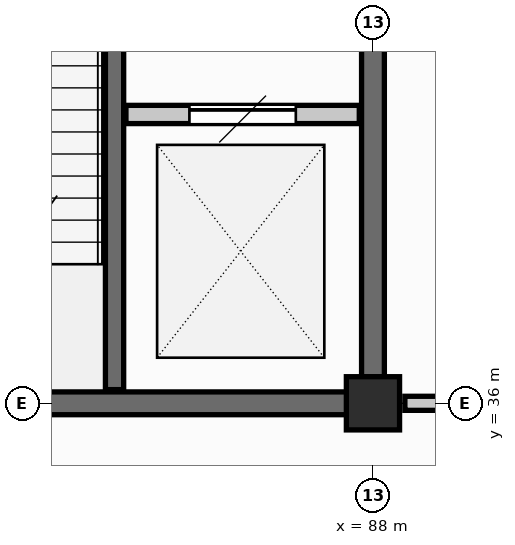
"""IFC4 building model, lengths in metres.
Left out: names, types, materials, properties, quantities, classifications, styles, units other than length and angle.
Written with IfcOpenShell. Run it as: python <this file> out.ifc"""

import sys

from ifc_helpers import new_model, si_unit, direction, frame, frame_2d, origin, origin_2d, place, context, subcontext, project, spatial, rectangle, extrude, element, fill, save


model = new_model("IFC4")
c1 = context("Model", 3, precision=1e-05, world=origin(), true_north=direction((0.0, 1.0)))
c2 = subcontext(c1, "Body", "Model", "MODEL_VIEW")
j1 = project(units=[si_unit("LENGTHUNIT", "METRE"), si_unit("PLANEANGLEUNIT", "RADIAN")], contexts=[c1])
p1 = place(None, origin())
s1 = spatial("IfcSite", under=j1, at=p1, CompositionType="ELEMENT")
p2 = place(p1, origin())
s2 = spatial("IfcBuilding", under=s1, at=p2, CompositionType="ELEMENT")
p3 = place(p2, origin())
s3 = spatial("IfcBuildingStorey", under=s2, at=p3, CompositionType="ELEMENT", Elevation=0.0)
p4 = place(p3, frame((88.0, 36.0, -1.25), z_axis=(0.0, 0.0, 1.0), x_axis=(1.0, 0.0, 0.0)))
e1 = element("IfcColumn", 1, at=p4, inside=s3, PredefinedType="COLUMN", context=c2, shape_type="SweptSolid", body=[
    extrude(rectangle(XDim=0.7, YDim=0.7, at=origin_2d()), origin(), (0.0, 0.0, 1.0), 6.05),
])
p5 = place(p3, frame((80.345, 36.0, -1.25), z_axis=(0.0, 0.0, 1.0), x_axis=(1.0, 0.0, 0.0)))
e2 = element("IfcWall", 2, at=p5, inside=s3, PredefinedType="SHEAR", context=c2, shape_type="SweptSolid", body=[
    extrude(rectangle(XDim=7.31, YDim=0.3, at=frame_2d((3.655, 0.0))), origin(), (0.0, 0.0, 1.0), 5.755),
])
p6 = place(p3, frame((88.0, 36.345, -1.25), z_axis=(0.0, 0.0, 1.0), x_axis=(0.0, 1.0, 0.0)))
e3 = element("IfcWall", 3, at=p6, inside=s3, PredefinedType="SHEAR", context=c2, shape_type="SweptSolid", body=[
    extrude(rectangle(XDim=8.31, YDim=0.3, at=frame_2d((4.155, 0.0))), origin(), (0.0, 0.0, 1.0), 5.755),
])
p7 = place(p3, frame((84.6, 36.18, -1.25), z_axis=(0.0, 0.0, 1.0), x_axis=(0.0, 1.0, 0.0)))
e4 = element("IfcWall", 4, at=p7, inside=s3, PredefinedType="SHEAR", context=c2, shape_type="SweptSolid", body=[
    extrude(rectangle(XDim=8.64, YDim=0.24, at=frame_2d((4.32, 0.0))), origin(), (0.0, 0.0, 1.0), 5.755),
])
p8 = place(p7, frame((6.02, 0.0, 1.25)))
e5 = element("IfcOpeningElement", 5, at=p8, cuts=e4, PredefinedType="OPENING", context=c2, shape_type="SweptSolid", body=[
    extrude(rectangle(XDim=1.35, YDim=2.2, at=frame_2d((0.675, 1.1))), frame((0.0, 0.13, 0.0), z_axis=(0.0, -1.0, 0.0), x_axis=(1.0, 0.0, 0.0)), (0.0, 0.0, 1.0), 0.26),
])
p9 = place(p7, frame((7.68, 0.0, 1.25)))
e6 = element("IfcOpeningElement", 6, at=p9, cuts=e4, PredefinedType="OPENING", context=c2, shape_type="SweptSolid", body=[
    extrude(rectangle(XDim=0.88, YDim=2.02, at=frame_2d((0.44, 1.01))), frame((0.0, 0.13, 0.0), z_axis=(0.0, -1.0, 0.0), x_axis=(1.0, 0.0, 0.0)), (0.0, 0.0, 1.0), 0.26),
])
p10 = place(p3, frame((84.75, 39.8, 0.0), z_axis=(0.0, 0.0, 1.0), x_axis=(1.0, 0.0, 0.0)))
e7 = element("IfcWall", 7, at=p10, inside=s3, PredefinedType="SHEAR", context=c2, shape_type="SweptSolid", body=[
    extrude(rectangle(XDim=3.07, YDim=0.24, at=frame_2d((1.535, 0.0))), origin(), (0.0, 0.0, 1.0), 3.855),
])
p11 = place(p10, frame((0.835, 0.0, 0.0)))
e8 = element("IfcOpeningElement", 8, at=p11, cuts=e7, PredefinedType="OPENING", context=c2, shape_type="SweptSolid", body=[
    extrude(rectangle(XDim=1.4, YDim=2.3, at=frame_2d((0.7, 1.15))), frame((0.0, 0.13, 0.0), z_axis=(0.0, -1.0, 0.0), x_axis=(1.0, 0.0, 0.0)), (0.0, 0.0, 1.0), 0.26),
])
p12 = place(p3, frame((88.42, 36.0, 0.0), z_axis=(0.0, 0.0, 1.0), x_axis=(1.0, 0.0, 0.0)))
e9 = element("IfcWall", 9, at=p12, inside=s3, PredefinedType="PARTITIONING", context=c2, shape_type="SweptSolid", body=[
    extrude(rectangle(XDim=7.16, YDim=0.185, at=frame_2d((3.58, 0.0))), origin(), (0.0, 0.0, 1.0), 3.55),
])
p13 = place(p12, frame((2.705, 0.0, 0.0)))
e10 = element("IfcOpeningElement", 10, at=p13, cuts=e9, PredefinedType="OPENING", context=c2, shape_type="SweptSolid", body=[
    extrude(rectangle(XDim=1.75, YDim=2.4, at=frame_2d((0.875, 1.2))), frame((0.0, 0.103, 0.0), z_axis=(0.0, -1.0, 0.0), x_axis=(1.0, 0.0, 0.0)), (0.0, 0.0, 1.0), 0.205),
])
p14 = place(p11, origin())
e11 = element("IfcDoor", 11, at=p14, inside=s3, OperationType="SLIDING_TO_LEFT", PredefinedType="DOOR", context=c2, shape_type="SweptSolid", body=[
    extrude(rectangle(XDim=1.4, YDim=2.3, at=frame_2d((0.7, 1.15))), frame((0.0, 0.025, 0.0), z_axis=(0.0, -1.0, 0.0), x_axis=(1.0, 0.0, 0.0)), (0.0, 0.0, 1.0), 0.05),
])
fill(e8, e11)
save(model, sys.argv[1])
